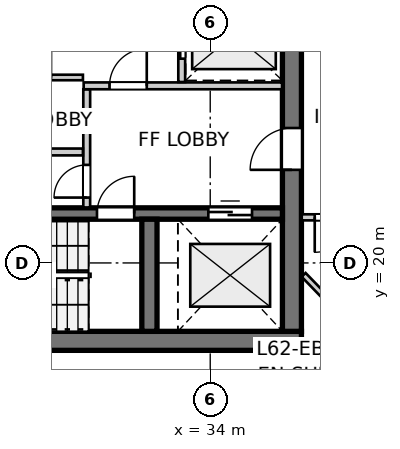
"""IFC4 building model, lengths in metres.
Left out: names, types, materials, properties, quantities, classifications, styles, units other than length and angle.
Written with IfcOpenShell. Run it as: python <this file> out.ifc"""

import sys

from ifc_helpers import new_model, si_unit, direction, frame, frame_2d, origin, place, context, subcontext, project, spatial, rectangle, extrude, source, transform, mapped, element, fill, save


model = new_model("IFC4")
c1 = context("Model", 3, precision=1e-05, world=origin(), true_north=direction((0.0, 1.0)))
c2 = subcontext(c1, "Body", "Model", "MODEL_VIEW")
j1 = project(units=[si_unit("LENGTHUNIT", "METRE"), si_unit("PLANEANGLEUNIT", "RADIAN")], contexts=[c1])
p1 = place(None, origin())
s1 = spatial("IfcSite", under=j1, at=p1, CompositionType="ELEMENT")
p2 = place(p1, origin())
s2 = spatial("IfcBuilding", under=s1, at=p2, CompositionType="ELEMENT")
p3 = place(p2, frame((0.0, 0.0, 208.4)))
s3 = spatial("IfcBuildingStorey", under=s2, at=p3, CompositionType="ELEMENT", Elevation=208.4)
p4 = place(p3, frame((24.3, 17.95, 0.0), z_axis=(0.0, 0.0, 1.0), x_axis=(1.0, 0.0, 0.0)))
e1 = element("IfcWall", 1, at=p4, inside=s3, PredefinedType="SHEAR", context=c2, shape_type="SweptSolid", body=[
    extrude(rectangle(XDim=12.1, YDim=0.5, at=frame_2d((6.05, 0.0))), origin(), (0.0, 0.0, 1.0), 2.935),
])
p5 = place(p3, frame((36.15, 18.2, 0.0), z_axis=(0.0, 0.0, 1.0), x_axis=(0.0, 1.0, 0.0)))
e2 = element("IfcWall", 2, at=p5, inside=s3, PredefinedType="SHEAR", context=c2, shape_type="SweptSolid", body=[
    extrude(rectangle(XDim=15.6, YDim=0.5, at=frame_2d((7.8, 0.0))), origin(), (0.0, 0.0, 1.0), 2.935),
])
p6 = place(p5, frame((4.25, 0.0, 0.0)))
e3 = element("IfcOpeningElement", 3, at=p6, cuts=e2, PredefinedType="OPENING", context=c2, shape_type="SweptSolid", body=[
    extrude(rectangle(XDim=1.1, YDim=2.15, at=frame_2d((0.55, 1.075))), frame((0.0, 0.26, 0.0), z_axis=(0.0, -1.0, 0.0), x_axis=(1.0, 0.0, 0.0)), (0.0, 0.0, 1.0), 0.52),
])
p7 = place(p5, frame((10.25, 0.0, 0.0)))
e4 = element("IfcOpeningElement", 4, at=p7, cuts=e2, PredefinedType="OPENING", context=c2, shape_type="SweptSolid", body=[
    extrude(rectangle(XDim=1.1, YDim=2.15, at=frame_2d((0.55, 1.075))), frame((0.0, 0.26, 0.0), z_axis=(0.0, -1.0, 0.0), x_axis=(1.0, 0.0, 0.0)), (0.0, 0.0, 1.0), 0.52),
])
p8 = place(p3, frame((24.8, 21.3, 0.0), z_axis=(0.0, 0.0, 1.0), x_axis=(1.0, 0.0, 0.0)))
e5 = element("IfcWall", 5, at=p8, inside=s3, PredefinedType="SHEAR", context=c2, shape_type="SweptSolid", body=[
    extrude(rectangle(XDim=11.1, YDim=0.3, at=frame_2d((5.55, 0.0))), origin(), (0.0, 0.0, 1.0), 2.935),
])
p9 = place(p8, frame((6.22, 0.0, 0.0)))
e6 = element("IfcOpeningElement", 6, at=p9, cuts=e5, PredefinedType="OPENING", context=c2, shape_type="SweptSolid", body=[
    extrude(rectangle(XDim=0.98, YDim=2.15, at=frame_2d((0.49, 1.075))), frame((0.0, 0.16, 0.0), z_axis=(0.0, -1.0, 0.0), x_axis=(1.0, 0.0, 0.0)), (0.0, 0.0, 1.0), 0.32),
])
p10 = place(p8, frame((9.15, 0.0, 0.0)))
e7 = element("IfcOpeningElement", 7, at=p10, cuts=e5, PredefinedType="OPENING", context=c2, shape_type="SweptSolid", body=[
    extrude(rectangle(XDim=1.15, YDim=2.15, at=frame_2d((0.575, 1.075))), frame((0.0, 0.16, 0.0), z_axis=(0.0, -1.0, 0.0), x_axis=(1.0, 0.0, 0.0)), (0.0, 0.0, 1.0), 0.32),
])
p11 = place(p3, frame((32.4, 18.2, 0.0), z_axis=(0.0, 0.0, 1.0), x_axis=(0.0, 1.0, 0.0)))
e8 = element("IfcWall", 8, at=p11, inside=s3, PredefinedType="SHEAR", context=c2, shape_type="SweptSolid", body=[
    extrude(rectangle(XDim=2.95, YDim=0.4, at=frame_2d((1.475, 0.0))), origin(), (0.0, 0.0, 1.0), 2.935),
])
p12 = place(p3, frame((30.75, 21.46, 0.0), z_axis=(0.0, 0.0, 1.0), x_axis=(0.0, 1.0, 0.0)))
e9 = element("IfcWall", 9, at=p12, inside=s3, PredefinedType="PARTITIONING", context=c2, shape_type="SweptSolid", body=[
    extrude(rectangle(XDim=3.11, YDim=0.18, at=frame_2d((1.555, 0.0))), origin(), (0.0, 0.0, 1.0), 2.935),
])
p13 = place(p12, frame((0.26, 0.0, 0.0)))
e10 = element("IfcOpeningElement", 10, at=p13, cuts=e9, PredefinedType="OPENING", context=c2, shape_type="SweptSolid", body=[
    extrude(rectangle(XDim=0.86, YDim=2.05, at=frame_2d((0.43, 1.025))), frame((0.0, 0.1, 0.0), z_axis=(0.0, -1.0, 0.0), x_axis=(1.0, 0.0, 0.0)), (0.0, 0.0, 1.0), 0.2),
])
p14 = place(p3, frame((30.67, 24.66, 0.0), z_axis=(0.0, 0.0, 1.0), x_axis=(1.0, 0.0, 0.0)))
e11 = element("IfcWall", 11, at=p14, inside=s3, PredefinedType="PARTITIONING", context=c2, shape_type="SweptSolid", body=[
    extrude(rectangle(XDim=5.22, YDim=0.18, at=frame_2d((2.61, 0.0))), origin(), (0.0, 0.0, 1.0), 2.935),
])
p15 = place(p14, frame((0.68, 0.0, 0.0)))
e12 = element("IfcOpeningElement", 12, at=p15, cuts=e11, PredefinedType="OPENING", context=c2, shape_type="SweptSolid", body=[
    extrude(rectangle(XDim=0.98, YDim=2.15, at=frame_2d((0.49, 1.075))), frame((0.0, 0.1, 0.0), z_axis=(0.0, -1.0, 0.0), x_axis=(1.0, 0.0, 0.0)), (0.0, 0.0, 1.0), 0.2),
])
p16 = place(p3, frame((33.25, 24.76, 0.0), z_axis=(0.0, 0.0, 1.0), x_axis=(0.0, 1.0, 0.0)))
e13 = element("IfcWall", 13, at=p16, inside=s3, PredefinedType="PARTITIONING", context=c2, shape_type="SweptSolid", body=[
    extrude(rectangle(XDim=2.48, YDim=0.18, at=frame_2d((1.24, 0.0))), origin(), (0.0, 0.0, 1.0), 2.935),
])
p17 = place(p16, frame((0.615, 0.0, 0.0)))
e14 = element("IfcOpeningElement", 14, at=p17, cuts=e13, PredefinedType="OPENING", context=c2, shape_type="SweptSolid", body=[
    extrude(rectangle(XDim=1.25, YDim=2.15, at=frame_2d((0.625, 1.075))), frame((0.0, 0.1, 0.0), z_axis=(0.0, -1.0, 0.0), x_axis=(1.0, 0.0, 0.0)), (0.0, 0.0, 1.0), 0.2),
])
p18 = place(p3, frame((24.81, 22.92, 0.0), z_axis=(0.0, 0.0, 1.0), x_axis=(1.0, 0.0, 0.0)))
e15 = element("IfcWall", 15, at=p18, inside=s3, PredefinedType="PARTITIONING", context=c2, shape_type="SweptSolid", body=[
    extrude(rectangle(XDim=5.84, YDim=0.18, at=frame_2d((2.92, 0.0))), origin(), (0.0, 0.0, 1.0), 2.935),
])
p19 = place(p3, frame((28.13, 24.88, 0.0), z_axis=(0.0, 0.0, 1.0), x_axis=(1.0, 0.0, 0.0)))
e16 = element("IfcWall", 16, at=p19, inside=s3, PredefinedType="PARTITIONING", context=c2, shape_type="SweptSolid", body=[
    extrude(rectangle(XDim=2.52, YDim=0.145, at=frame_2d((1.26, 0.0))), origin(), (0.0, 0.0, 1.0), 2.935),
])
p20 = place(p19, frame((0.82, 0.0, 0.0)))
e17 = element("IfcOpeningElement", 17, at=p20, cuts=e16, PredefinedType="OPENING", context=c2, shape_type="SweptSolid", body=[
    extrude(rectangle(XDim=0.86, YDim=2.05, at=frame_2d((0.43, 1.025))), frame((0.0, 0.083, 0.0), z_axis=(0.0, -1.0, 0.0), x_axis=(1.0, 0.0, 0.0)), (0.0, 0.0, 1.0), 0.165),
])
p21 = place(p3, frame((38.02, 21.2, 0.0), z_axis=(0.0, 0.0, 1.0), x_axis=(-1.0, 0.0, 0.0)))
e18 = element("IfcWall", 18, at=p21, inside=s3, PredefinedType="PARTITIONING", context=c2, shape_type="SweptSolid", body=[
    extrude(rectangle(XDim=1.612, YDim=0.16, at=frame_2d((0.806, 0.0))), origin(), (0.0, 0.0, 1.0), 2.935),
])
p22 = place(p21, frame((0.35, 0.0, 0.0)))
e19 = element("IfcOpeningElement", 19, at=p22, cuts=e18, PredefinedType="OPENING", context=c2, shape_type="SweptSolid", body=[
    extrude(rectangle(XDim=0.92, YDim=2.1, at=frame_2d((0.46, 1.05))), frame((0.0, 0.09, 0.0), z_axis=(0.0, -1.0, 0.0), x_axis=(1.0, 0.0, 0.0)), (0.0, 0.0, 1.0), 0.18),
])
p23 = place(p3, frame((36.458, 19.686, 0.0), z_axis=(0.0, 0.0, 1.0), x_axis=(0.695231916786, -0.718785490868, 0.0)))
e20 = element("IfcWall", 20, at=p23, inside=s3, PredefinedType="PARTITIONING", context=c2, shape_type="SweptSolid", body=[
    extrude(rectangle(XDim=1.824, YDim=0.145, at=frame_2d((0.912, 0.0))), origin(), (0.0, 0.0, 1.0), 2.935),
])
m1 = source(origin(), c2, "Body", "SweptSolid", [
    extrude(rectangle(XDim=0.98, YDim=2.15, at=frame_2d((0.49, 1.075))), frame((0.0, 0.025, 0.0), z_axis=(0.0, -1.0, 0.0), x_axis=(1.0, 0.0, 0.0)), (0.0, 0.0, 1.0), 0.05),
])
p24 = place(p9, origin())
e21 = element("IfcDoor", 21, at=p24, inside=s3, OperationType="SINGLE_SWING_RIGHT", PredefinedType="DOOR", context=c2, shape_type="MappedRepresentation", body=[
    mapped(m1, transform((0.0, 0.0, 0.0), x_axis=(1.0, 0.0, 0.0), y_axis=(0.0, 1.0, 0.0), z_axis=(0.0, 0.0, 1.0), scale=1.0)),
])
fill(e6, e21)
m2 = source(origin(), c2, "Body", "SweptSolid", [
    extrude(rectangle(XDim=1.15, YDim=2.15, at=frame_2d((0.575, 1.075))), frame((0.0, 0.025, 0.0), z_axis=(0.0, -1.0, 0.0), x_axis=(1.0, 0.0, 0.0)), (0.0, 0.0, 1.0), 0.05),
])
p25 = place(p10, origin())
e22 = element("IfcDoor", 22, at=p25, inside=s3, OperationType="DOUBLE_DOOR_SLIDING", PredefinedType="DOOR", context=c2, shape_type="MappedRepresentation", body=[
    mapped(m2, transform((0.0, 0.0, 0.0), x_axis=(1.0, 0.0, 0.0), y_axis=(0.0, 1.0, 0.0), z_axis=(0.0, 0.0, 1.0), scale=1.0)),
])
fill(e7, e22)
m3 = source(origin(), c2, "Body", "SweptSolid", [
    extrude(rectangle(XDim=1.1, YDim=2.15, at=frame_2d((0.55, 1.075))), frame((0.0, 0.025, 0.0), z_axis=(0.0, -1.0, 0.0), x_axis=(1.0, 0.0, 0.0)), (0.0, 0.0, 1.0), 0.05),
])
p26 = place(p6, origin())
e23 = element("IfcDoor", 23, at=p26, inside=s3, OperationType="SINGLE_SWING_LEFT", PredefinedType="DOOR", context=c2, shape_type="MappedRepresentation", body=[
    mapped(m3, transform((0.0, 0.0, 0.0), x_axis=(1.0, 0.0, 0.0), y_axis=(0.0, 1.0, 0.0), z_axis=(0.0, 0.0, 1.0), scale=1.0)),
])
fill(e3, e23)
m4 = source(origin(), c2, "Body", "SweptSolid", [
    extrude(rectangle(XDim=0.86, YDim=2.05, at=frame_2d((0.43, 1.025))), frame((0.0, 0.025, 0.0), z_axis=(0.0, -1.0, 0.0), x_axis=(1.0, 0.0, 0.0)), (0.0, 0.0, 1.0), 0.05),
])
p27 = place(p13, origin())
e24 = element("IfcDoor", 24, at=p27, inside=s3, OperationType="SINGLE_SWING_LEFT", PredefinedType="DOOR", context=c2, shape_type="MappedRepresentation", body=[
    mapped(m4, transform((0.0, 0.0, 0.0), x_axis=(1.0, 0.0, 0.0), y_axis=(0.0, 1.0, 0.0), z_axis=(0.0, 0.0, 1.0), scale=1.0)),
])
fill(e10, e24)
p28 = place(p15, origin())
e25 = element("IfcDoor", 25, at=p28, inside=s3, OperationType="SINGLE_SWING_RIGHT", PredefinedType="DOOR", context=c2, shape_type="MappedRepresentation", body=[
    mapped(m1, transform((0.0, 0.0, 0.0), x_axis=(1.0, 0.0, 0.0), y_axis=(0.0, 1.0, 0.0), z_axis=(0.0, 0.0, 1.0), scale=1.0)),
])
fill(e12, e25)
m5 = source(origin(), c2, "Body", "SweptSolid", [
    extrude(rectangle(XDim=1.25, YDim=2.15, at=frame_2d((0.625, 1.075))), frame((0.0, 0.025, 0.0), z_axis=(0.0, -1.0, 0.0), x_axis=(1.0, 0.0, 0.0)), (0.0, 0.0, 1.0), 0.05),
])
p29 = place(p17, origin())
e26 = element("IfcDoor", 26, at=p29, inside=s3, OperationType="DOUBLE_DOOR_SLIDING", PredefinedType="DOOR", context=c2, shape_type="MappedRepresentation", body=[
    mapped(m5, transform((0.0, 0.0, 0.0), x_axis=(1.0, 0.0, 0.0), y_axis=(0.0, 1.0, 0.0), z_axis=(0.0, 0.0, 1.0), scale=1.0)),
])
fill(e14, e26)
m6 = source(origin(), c2, "Body", "SweptSolid", [
    extrude(rectangle(XDim=0.92, YDim=2.1, at=frame_2d((0.46, 1.05))), frame((0.0, 0.025, 0.0), z_axis=(0.0, -1.0, 0.0), x_axis=(1.0, 0.0, 0.0)), (0.0, 0.0, 1.0), 0.05),
])
p30 = place(p22, origin())
e27 = element("IfcDoor", 27, at=p30, inside=s3, OperationType="SINGLE_SWING_RIGHT", PredefinedType="DOOR", context=c2, shape_type="MappedRepresentation", body=[
    mapped(m6, transform((0.0, 0.0, 0.0), x_axis=(1.0, 0.0, 0.0), y_axis=(0.0, 1.0, 0.0), z_axis=(0.0, 0.0, 1.0), scale=1.0)),
])
fill(e19, e27)
save(model, sys.argv[1])
